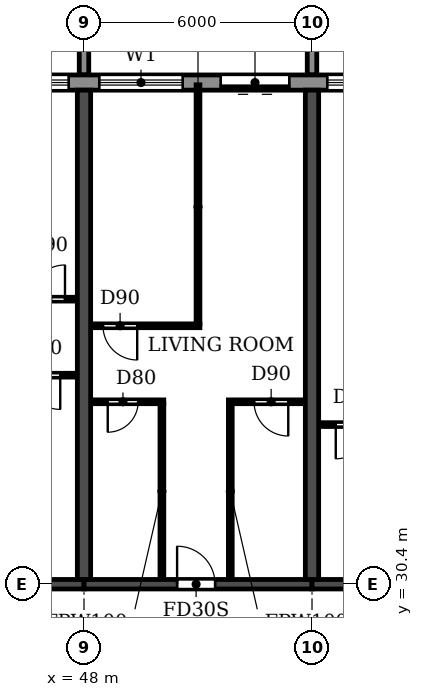
"""IFC4 building model, lengths in metres.
Left out: names, types, materials, properties, quantities, classifications, styles, units other than length and angle.
Written with IfcOpenShell. Run it as: python <this file> out.ifc"""

import sys

from ifc_helpers import new_model, si_unit, direction, frame, frame_2d, origin, place, context, subcontext, project, spatial, polyline, rectangle, outline, extrude, source, transform, mapped, element, fill, save


model = new_model("IFC4")
c1 = context("Model", 3, precision=1e-05, world=origin(), true_north=direction((0.0, 1.0)))
c2 = subcontext(c1, "Body", "Model", "MODEL_VIEW")
j1 = project(units=[si_unit("LENGTHUNIT", "METRE"), si_unit("PLANEANGLEUNIT", "RADIAN")], contexts=[c1])
p1 = place(None, origin())
s1 = spatial("IfcSite", under=j1, at=p1, CompositionType="ELEMENT")
p2 = place(p1, origin())
s2 = spatial("IfcBuilding", under=s1, at=p2, CompositionType="ELEMENT")
p3 = place(p2, frame((0.0, 0.0, 72.9)))
s3 = spatial("IfcBuildingStorey", under=s2, at=p3, CompositionType="ELEMENT", Elevation=72.9)
for number, where, z_axis, x_axis in (
    (1, (48.0, 30.525, 0.0), (0.0, 0.0, 1.0), (0.0, 1.0, 0.0)),
    (2, (54.0, 30.525, 0.0), (0.0, 0.0, 1.0), (0.0, 1.0, 0.0)),
):
    element("IfcWall", number, at=place(p3, frame(where, z_axis=z_axis, x_axis=x_axis)), inside=s3, PredefinedType="SHEAR", context=c2, shape_type="SweptSolid", body=[
        extrude(rectangle(XDim=12.875, YDim=0.35, at=frame_2d((6.438, 0.0))), origin(), (0.0, 0.0, 1.0), 3.06),
    ])
p4 = place(p3, frame((42.0, 30.4, 0.0), z_axis=(0.0, 0.0, 1.0), x_axis=(1.0, 0.0, 0.0)))
e3 = element("IfcWall", 3, at=p4, inside=s3, PredefinedType="SHEAR", context=c2, shape_type="SweptSolid", body=[
    extrude(rectangle(XDim=6.0, YDim=0.25, at=frame_2d((3.0, 0.0))), origin(), (0.0, 0.0, 1.0), 2.46),
])
p5 = place(p4, frame((2.45, 0.0, 0.0)))
e4 = element("IfcOpeningElement", 4, at=p5, cuts=e3, PredefinedType="OPENING", context=c2, shape_type="SweptSolid", body=[
    extrude(rectangle(XDim=1.0, YDim=2.1, at=frame_2d((0.5, 1.05))), frame((0.0, 0.135, 0.0), z_axis=(0.0, -1.0, 0.0), x_axis=(1.0, 0.0, 0.0)), (0.0, 0.0, 1.0), 0.27),
])
p6 = place(p3, frame((48.0, 30.4, 0.0), z_axis=(0.0, 0.0, 1.0), x_axis=(1.0, 0.0, 0.0)))
e5 = element("IfcWall", 5, at=p6, inside=s3, PredefinedType="SHEAR", context=c2, shape_type="SweptSolid", body=[
    extrude(rectangle(XDim=6.0, YDim=0.25, at=frame_2d((3.0, 0.0))), origin(), (0.0, 0.0, 1.0), 2.46),
])
p7 = place(p6, frame((2.45, 0.0, 0.0)))
e6 = element("IfcOpeningElement", 6, at=p7, cuts=e5, PredefinedType="OPENING", context=c2, shape_type="SweptSolid", body=[
    extrude(rectangle(XDim=1.0, YDim=2.1, at=frame_2d((0.5, 1.05))), frame((0.0, 0.135, 0.0), z_axis=(0.0, -1.0, 0.0), x_axis=(1.0, 0.0, 0.0)), (0.0, 0.0, 1.0), 0.27),
])
p8 = place(p3, frame((54.0, 30.4, 0.0), z_axis=(0.0, 0.0, 1.0), x_axis=(1.0, 0.0, 0.0)))
e7 = element("IfcWall", 7, at=p8, inside=s3, PredefinedType="SHEAR", context=c2, shape_type="SweptSolid", body=[
    extrude(rectangle(XDim=6.0, YDim=0.25, at=frame_2d((3.0, 0.0))), origin(), (0.0, 0.0, 1.0), 2.46),
])
p9 = place(p8, frame((2.55, 0.0, 0.0)))
e8 = element("IfcOpeningElement", 8, at=p9, cuts=e7, PredefinedType="OPENING", context=c2, shape_type="SweptSolid", body=[
    extrude(rectangle(XDim=1.0, YDim=2.1, at=frame_2d((0.5, 1.05))), frame((0.0, 0.135, 0.0), z_axis=(0.0, -1.0, 0.0), x_axis=(1.0, 0.0, 0.0)), (0.0, 0.0, 1.0), 0.27),
])
p10 = place(p3, frame((91.317, 43.6, 0.0), z_axis=(0.0, 0.0, 1.0), x_axis=(-1.0, 0.0, 0.0)))
e9 = element("IfcWall", 9, at=p10, inside=s3, PredefinedType="STANDARD", context=c2, shape_type="SweptSolid", body=[
    extrude(rectangle(XDim=80.634, YDim=0.4, at=frame_2d((40.317, 0.0))), origin(), (0.0, 0.0, 1.0), 3.06),
])
p11 = place(p10, frame((76.717, 0.0, 0.9)))
e10 = element("IfcOpeningElement", 10, at=p11, cuts=e9, PredefinedType="OPENING", context=c2, shape_type="SweptSolid", body=[
    extrude(rectangle(XDim=2.2, YDim=1.5, at=frame_2d((1.1, 0.75))), frame((0.0, 0.21, 0.0), z_axis=(0.0, -1.0, 0.0), x_axis=(1.0, 0.0, 0.0)), (0.0, 0.0, 1.0), 0.42),
])
p12 = place(p10, frame((73.917, 0.0, 0.0)))
e11 = element("IfcOpeningElement", 11, at=p12, cuts=e9, PredefinedType="OPENING", context=c2, shape_type="SweptSolid", body=[
    extrude(rectangle(XDim=1.8, YDim=2.4, at=frame_2d((0.9, 1.2))), frame((0.0, 0.21, 0.0), z_axis=(0.0, -1.0, 0.0), x_axis=(1.0, 0.0, 0.0)), (0.0, 0.0, 1.0), 0.42),
])
p13 = place(p10, frame((70.917, 0.0, 0.0)))
e12 = element("IfcOpeningElement", 12, at=p13, cuts=e9, PredefinedType="OPENING", context=c2, shape_type="SweptSolid", body=[
    extrude(rectangle(XDim=1.8, YDim=2.4, at=frame_2d((0.9, 1.2))), frame((0.0, 0.21, 0.0), z_axis=(0.0, -1.0, 0.0), x_axis=(1.0, 0.0, 0.0)), (0.0, 0.0, 1.0), 0.42),
])
p14 = place(p10, frame((67.717, 0.0, 0.9)))
e13 = element("IfcOpeningElement", 13, at=p14, cuts=e9, PredefinedType="OPENING", context=c2, shape_type="SweptSolid", body=[
    extrude(rectangle(XDim=2.2, YDim=1.5, at=frame_2d((1.1, 0.75))), frame((0.0, 0.21, 0.0), z_axis=(0.0, -1.0, 0.0), x_axis=(1.0, 0.0, 0.0)), (0.0, 0.0, 1.0), 0.42),
])
p15 = place(p10, frame((64.717, 0.0, 0.9)))
e14 = element("IfcOpeningElement", 14, at=p15, cuts=e9, PredefinedType="OPENING", context=c2, shape_type="SweptSolid", body=[
    extrude(rectangle(XDim=2.2, YDim=1.5, at=frame_2d((1.1, 0.75))), frame((0.0, 0.21, 0.0), z_axis=(0.0, -1.0, 0.0), x_axis=(1.0, 0.0, 0.0)), (0.0, 0.0, 1.0), 0.42),
])
p16 = place(p10, frame((61.917, 0.0, 0.0)))
e15 = element("IfcOpeningElement", 15, at=p16, cuts=e9, PredefinedType="OPENING", context=c2, shape_type="SweptSolid", body=[
    extrude(rectangle(XDim=1.8, YDim=2.4, at=frame_2d((0.9, 1.2))), frame((0.0, 0.21, 0.0), z_axis=(0.0, -1.0, 0.0), x_axis=(1.0, 0.0, 0.0)), (0.0, 0.0, 1.0), 0.42),
])
p17 = place(p10, frame((58.717, 0.0, 0.9)))
e16 = element("IfcOpeningElement", 16, at=p17, cuts=e9, PredefinedType="OPENING", context=c2, shape_type="SweptSolid", body=[
    extrude(rectangle(XDim=2.2, YDim=1.5, at=frame_2d((1.1, 0.75))), frame((0.0, 0.21, 0.0), z_axis=(0.0, -1.0, 0.0), x_axis=(1.0, 0.0, 0.0)), (0.0, 0.0, 1.0), 0.42),
])
p18 = place(p10, frame((55.917, 0.0, 0.0)))
e17 = element("IfcOpeningElement", 17, at=p18, cuts=e9, PredefinedType="OPENING", context=c2, shape_type="SweptSolid", body=[
    extrude(rectangle(XDim=1.8, YDim=2.4, at=frame_2d((0.9, 1.2))), frame((0.0, 0.21, 0.0), z_axis=(0.0, -1.0, 0.0), x_axis=(1.0, 0.0, 0.0)), (0.0, 0.0, 1.0), 0.42),
])
p19 = place(p10, frame((52.717, 0.0, 0.9)))
e18 = element("IfcOpeningElement", 18, at=p19, cuts=e9, PredefinedType="OPENING", context=c2, shape_type="SweptSolid", body=[
    extrude(rectangle(XDim=2.2, YDim=1.5, at=frame_2d((1.1, 0.75))), frame((0.0, 0.21, 0.0), z_axis=(0.0, -1.0, 0.0), x_axis=(1.0, 0.0, 0.0)), (0.0, 0.0, 1.0), 0.42),
])
p20 = place(p10, frame((49.717, 0.0, 0.9)))
e19 = element("IfcOpeningElement", 19, at=p20, cuts=e9, PredefinedType="OPENING", context=c2, shape_type="SweptSolid", body=[
    extrude(rectangle(XDim=2.2, YDim=1.5, at=frame_2d((1.1, 0.75))), frame((0.0, 0.21, 0.0), z_axis=(0.0, -1.0, 0.0), x_axis=(1.0, 0.0, 0.0)), (0.0, 0.0, 1.0), 0.42),
])
p21 = place(p10, frame((46.917, 0.0, 0.0)))
e20 = element("IfcOpeningElement", 20, at=p21, cuts=e9, PredefinedType="OPENING", context=c2, shape_type="SweptSolid", body=[
    extrude(rectangle(XDim=1.8, YDim=2.4, at=frame_2d((0.9, 1.2))), frame((0.0, 0.21, 0.0), z_axis=(0.0, -1.0, 0.0), x_axis=(1.0, 0.0, 0.0)), (0.0, 0.0, 1.0), 0.42),
])
p22 = place(p10, frame((43.717, 0.0, 0.9)))
e21 = element("IfcOpeningElement", 21, at=p22, cuts=e9, PredefinedType="OPENING", context=c2, shape_type="SweptSolid", body=[
    extrude(rectangle(XDim=2.2, YDim=1.5, at=frame_2d((1.1, 0.75))), frame((0.0, 0.21, 0.0), z_axis=(0.0, -1.0, 0.0), x_axis=(1.0, 0.0, 0.0)), (0.0, 0.0, 1.0), 0.42),
])
p23 = place(p10, frame((40.717, 0.0, 0.9)))
e22 = element("IfcOpeningElement", 22, at=p23, cuts=e9, PredefinedType="OPENING", context=c2, shape_type="SweptSolid", body=[
    extrude(rectangle(XDim=2.2, YDim=1.5, at=frame_2d((1.1, 0.75))), frame((0.0, 0.21, 0.0), z_axis=(0.0, -1.0, 0.0), x_axis=(1.0, 0.0, 0.0)), (0.0, 0.0, 1.0), 0.42),
])
p24 = place(p10, frame((37.917, 0.0, 0.0)))
e23 = element("IfcOpeningElement", 23, at=p24, cuts=e9, PredefinedType="OPENING", context=c2, shape_type="SweptSolid", body=[
    extrude(rectangle(XDim=1.8, YDim=2.4, at=frame_2d((0.9, 1.2))), frame((0.0, 0.21, 0.0), z_axis=(0.0, -1.0, 0.0), x_axis=(1.0, 0.0, 0.0)), (0.0, 0.0, 1.0), 0.42),
])
p25 = place(p10, frame((34.717, 0.0, 0.9)))
e24 = element("IfcOpeningElement", 24, at=p25, cuts=e9, PredefinedType="OPENING", context=c2, shape_type="SweptSolid", body=[
    extrude(rectangle(XDim=2.2, YDim=1.5, at=frame_2d((1.1, 0.75))), frame((0.0, 0.21, 0.0), z_axis=(0.0, -1.0, 0.0), x_axis=(1.0, 0.0, 0.0)), (0.0, 0.0, 1.0), 0.42),
])
p26 = place(p10, frame((31.917, 0.0, 0.0)))
e25 = element("IfcOpeningElement", 25, at=p26, cuts=e9, PredefinedType="OPENING", context=c2, shape_type="SweptSolid", body=[
    extrude(rectangle(XDim=1.8, YDim=2.4, at=frame_2d((0.9, 1.2))), frame((0.0, 0.21, 0.0), z_axis=(0.0, -1.0, 0.0), x_axis=(1.0, 0.0, 0.0)), (0.0, 0.0, 1.0), 0.42),
])
p27 = place(p10, frame((28.717, 0.0, 0.9)))
e26 = element("IfcOpeningElement", 26, at=p27, cuts=e9, PredefinedType="OPENING", context=c2, shape_type="SweptSolid", body=[
    extrude(rectangle(XDim=2.2, YDim=1.5, at=frame_2d((1.1, 0.75))), frame((0.0, 0.21, 0.0), z_axis=(0.0, -1.0, 0.0), x_axis=(1.0, 0.0, 0.0)), (0.0, 0.0, 1.0), 0.42),
])
p28 = place(p10, frame((25.717, 0.0, 0.9)))
e27 = element("IfcOpeningElement", 27, at=p28, cuts=e9, PredefinedType="OPENING", context=c2, shape_type="SweptSolid", body=[
    extrude(rectangle(XDim=2.2, YDim=1.5, at=frame_2d((1.1, 0.75))), frame((0.0, 0.21, 0.0), z_axis=(0.0, -1.0, 0.0), x_axis=(1.0, 0.0, 0.0)), (0.0, 0.0, 1.0), 0.42),
])
p29 = place(p10, frame((22.717, 0.0, 0.9)))
e28 = element("IfcOpeningElement", 28, at=p29, cuts=e9, PredefinedType="OPENING", context=c2, shape_type="SweptSolid", body=[
    extrude(rectangle(XDim=2.2, YDim=1.5, at=frame_2d((1.1, 0.75))), frame((0.0, 0.21, 0.0), z_axis=(0.0, -1.0, 0.0), x_axis=(1.0, 0.0, 0.0)), (0.0, 0.0, 1.0), 0.42),
])
p30 = place(p10, frame((19.917, 0.0, 0.0)))
e29 = element("IfcOpeningElement", 29, at=p30, cuts=e9, PredefinedType="OPENING", context=c2, shape_type="SweptSolid", body=[
    extrude(rectangle(XDim=1.8, YDim=2.4, at=frame_2d((0.9, 1.2))), frame((0.0, 0.21, 0.0), z_axis=(0.0, -1.0, 0.0), x_axis=(1.0, 0.0, 0.0)), (0.0, 0.0, 1.0), 0.42),
])
p31 = place(p10, frame((16.717, 0.0, 0.9)))
e30 = element("IfcOpeningElement", 30, at=p31, cuts=e9, PredefinedType="OPENING", context=c2, shape_type="SweptSolid", body=[
    extrude(rectangle(XDim=2.2, YDim=1.5, at=frame_2d((1.1, 0.75))), frame((0.0, 0.21, 0.0), z_axis=(0.0, -1.0, 0.0), x_axis=(1.0, 0.0, 0.0)), (0.0, 0.0, 1.0), 0.42),
])
p32 = place(p10, frame((13.717, 0.0, 0.9)))
e31 = element("IfcOpeningElement", 31, at=p32, cuts=e9, PredefinedType="OPENING", context=c2, shape_type="SweptSolid", body=[
    extrude(rectangle(XDim=2.2, YDim=1.5, at=frame_2d((1.1, 0.75))), frame((0.0, 0.21, 0.0), z_axis=(0.0, -1.0, 0.0), x_axis=(1.0, 0.0, 0.0)), (0.0, 0.0, 1.0), 0.42),
])
p33 = place(p10, frame((10.717, 0.0, 0.9)))
e32 = element("IfcOpeningElement", 32, at=p33, cuts=e9, PredefinedType="OPENING", context=c2, shape_type="SweptSolid", body=[
    extrude(rectangle(XDim=2.2, YDim=1.5, at=frame_2d((1.1, 0.75))), frame((0.0, 0.21, 0.0), z_axis=(0.0, -1.0, 0.0), x_axis=(1.0, 0.0, 0.0)), (0.0, 0.0, 1.0), 0.42),
])
p34 = place(p10, frame((7.917, 0.0, 0.0)))
e33 = element("IfcOpeningElement", 33, at=p34, cuts=e9, PredefinedType="OPENING", context=c2, shape_type="SweptSolid", body=[
    extrude(rectangle(XDim=1.8, YDim=2.4, at=frame_2d((0.9, 1.2))), frame((0.0, 0.21, 0.0), z_axis=(0.0, -1.0, 0.0), x_axis=(1.0, 0.0, 0.0)), (0.0, 0.0, 1.0), 0.42),
])
p35 = place(p10, frame((4.717, 0.0, 0.9)))
e34 = element("IfcOpeningElement", 34, at=p35, cuts=e9, PredefinedType="OPENING", context=c2, shape_type="SweptSolid", body=[
    extrude(rectangle(XDim=2.2, YDim=1.5, at=frame_2d((1.1, 0.75))), frame((0.0, 0.21, 0.0), z_axis=(0.0, -1.0, 0.0), x_axis=(1.0, 0.0, 0.0)), (0.0, 0.0, 1.0), 0.42),
])
p36 = place(p10, frame((1.917, 0.0, 0.0)))
e35 = element("IfcOpeningElement", 35, at=p36, cuts=e9, PredefinedType="OPENING", context=c2, shape_type="SweptSolid", body=[
    extrude(rectangle(XDim=1.8, YDim=2.4, at=frame_2d((0.9, 1.2))), frame((0.0, 0.21, 0.0), z_axis=(0.0, -1.0, 0.0), x_axis=(1.0, 0.0, 0.0)), (0.0, 0.0, 1.0), 0.42),
])
m1 = source(origin(), c2, "Body", "SweptSolid", [
    extrude(outline(polyline([(0.0, 0.0), (0.25, 0.0), (0.25, 3.1), (0.0, 3.1), (0.0, 0.0)])), origin(), (0.0, 0.0, 1.0), 3.1),
])
for number, where in (
    (36, (47.875, 43.8, 0.0)),
    (37, (53.875, 43.8, 0.0)),
):
    element("IfcWall", number, at=place(p3, frame(where)), inside=s3, PredefinedType="STANDARD", context=c2, shape_type="MappedRepresentation", body=[
        mapped(m1, transform((0.0, 0.0, 0.0))),
    ])
p37 = place(p3, frame((54.185, 34.6, 0.0), z_axis=(0.0, 0.0, 1.0), x_axis=(1.0, 0.0, 0.0)))
e38 = element("IfcWall", 38, at=p37, inside=s3, PredefinedType="PARTITIONING", context=c2, shape_type="SweptSolid", body=[
    extrude(rectangle(XDim=2.015, YDim=0.1, at=frame_2d((1.007, 0.0))), origin(), (0.0, 0.0, 1.0), 3.06),
])
p38 = place(p37, frame((0.44, 0.0, 0.0)))
e39 = element("IfcOpeningElement", 39, at=p38, cuts=e38, PredefinedType="OPENING", context=c2, shape_type="SweptSolid", body=[
    extrude(rectangle(XDim=0.9, YDim=2.1, at=frame_2d((0.45, 1.05))), frame((0.0, 0.06, 0.0), z_axis=(0.0, -1.0, 0.0), x_axis=(1.0, 0.0, 0.0)), (0.0, 0.0, 1.0), 0.12),
])
p39 = place(p3, frame((48.185, 35.2, 0.0), z_axis=(0.0, 0.0, 1.0), x_axis=(1.0, 0.0, 0.0)))
e40 = element("IfcWall", 40, at=p39, inside=s3, PredefinedType="PARTITIONING", context=c2, shape_type="SweptSolid", body=[
    extrude(rectangle(XDim=1.915, YDim=0.1, at=frame_2d((0.958, 0.0))), origin(), (0.0, 0.0, 1.0), 3.06),
])
p40 = place(p39, frame((0.44, 0.0, 0.0)))
e41 = element("IfcOpeningElement", 41, at=p40, cuts=e40, PredefinedType="OPENING", context=c2, shape_type="SweptSolid", body=[
    extrude(rectangle(XDim=0.8, YDim=2.1, at=frame_2d((0.4, 1.05))), frame((0.0, 0.06, 0.0), z_axis=(0.0, -1.0, 0.0), x_axis=(1.0, 0.0, 0.0)), (0.0, 0.0, 1.0), 0.12),
])
p41 = place(p3, frame((51.8, 35.2, 0.0), z_axis=(0.0, 0.0, 1.0), x_axis=(1.0, 0.0, 0.0)))
e42 = element("IfcWall", 42, at=p41, inside=s3, PredefinedType="PARTITIONING", context=c2, shape_type="SweptSolid", body=[
    extrude(rectangle(XDim=2.015, YDim=0.1, at=frame_2d((1.007, 0.0))), origin(), (0.0, 0.0, 1.0), 3.06),
])
p42 = place(p41, frame((0.675, 0.0, 0.0)))
e43 = element("IfcOpeningElement", 43, at=p42, cuts=e42, PredefinedType="OPENING", context=c2, shape_type="SweptSolid", body=[
    extrude(rectangle(XDim=0.9, YDim=2.1, at=frame_2d((0.45, 1.05))), frame((0.0, 0.06, 0.0), z_axis=(0.0, -1.0, 0.0), x_axis=(1.0, 0.0, 0.0)), (0.0, 0.0, 1.0), 0.12),
])
p43 = place(p3, frame((45.8, 35.9, 0.0), z_axis=(0.0, 0.0, 1.0), x_axis=(1.0, 0.0, 0.0)))
e44 = element("IfcWall", 44, at=p43, inside=s3, PredefinedType="PARTITIONING", context=c2, shape_type="SweptSolid", body=[
    extrude(rectangle(XDim=2.015, YDim=0.1, at=frame_2d((1.007, 0.0))), origin(), (0.0, 0.0, 1.0), 3.06),
])
p44 = place(p43, frame((0.675, 0.0, 0.0)))
e45 = element("IfcOpeningElement", 45, at=p44, cuts=e44, PredefinedType="OPENING", context=c2, shape_type="SweptSolid", body=[
    extrude(rectangle(XDim=0.9, YDim=2.1, at=frame_2d((0.45, 1.05))), frame((0.0, 0.06, 0.0), z_axis=(0.0, -1.0, 0.0), x_axis=(1.0, 0.0, 0.0)), (0.0, 0.0, 1.0), 0.12),
])
p45 = place(p3, frame((48.185, 37.2, 0.0), z_axis=(0.0, 0.0, 1.0), x_axis=(1.0, 0.0, 0.0)))
e46 = element("IfcWall", 46, at=p45, inside=s3, PredefinedType="PARTITIONING", context=c2, shape_type="SweptSolid", body=[
    extrude(rectangle(XDim=2.865, YDim=0.1, at=frame_2d((1.433, 0.0))), origin(), (0.0, 0.0, 1.0), 3.06),
])
p46 = place(p45, frame((0.315, 0.0, 0.0)))
e47 = element("IfcOpeningElement", 47, at=p46, cuts=e46, PredefinedType="OPENING", context=c2, shape_type="SweptSolid", body=[
    extrude(rectangle(XDim=0.9, YDim=2.1, at=frame_2d((0.45, 1.05))), frame((0.0, 0.06, 0.0), z_axis=(0.0, -1.0, 0.0), x_axis=(1.0, 0.0, 0.0)), (0.0, 0.0, 1.0), 0.12),
])
p47 = place(p3, frame((44.95, 37.9, 0.0), z_axis=(0.0, 0.0, 1.0), x_axis=(1.0, 0.0, 0.0)))
e48 = element("IfcWall", 48, at=p47, inside=s3, PredefinedType="PARTITIONING", context=c2, shape_type="SweptSolid", body=[
    extrude(rectangle(XDim=2.865, YDim=0.1, at=frame_2d((1.433, 0.0))), origin(), (0.0, 0.0, 1.0), 3.06),
])
p48 = place(p47, frame((1.65, 0.0, 0.0)))
e49 = element("IfcOpeningElement", 49, at=p48, cuts=e48, PredefinedType="OPENING", context=c2, shape_type="SweptSolid", body=[
    extrude(rectangle(XDim=0.9, YDim=2.1, at=frame_2d((0.45, 1.05))), frame((0.0, 0.06, 0.0), z_axis=(0.0, -1.0, 0.0), x_axis=(1.0, 0.0, 0.0)), (0.0, 0.0, 1.0), 0.12),
])
p49 = place(p3, frame((50.05, 30.535, 0.0), z_axis=(0.0, 0.0, 1.0), x_axis=(0.0, 1.0, 0.0)))
e50 = element("IfcWall", 50, at=p49, inside=s3, PredefinedType="PARTITIONING", context=c2, shape_type="SweptSolid", body=[
    extrude(rectangle(XDim=4.615, YDim=0.1, at=frame_2d((2.308, 0.0))), origin(), (0.0, 0.0, 1.0), 3.06),
])
p50 = place(p3, frame((51.0, 37.25, 0.0), z_axis=(0.0, 0.0, 1.0), x_axis=(0.0, 1.0, 0.0)))
e51 = element("IfcWall", 51, at=p50, inside=s3, PredefinedType="PARTITIONING", context=c2, shape_type="SweptSolid", body=[
    extrude(rectangle(XDim=6.29, YDim=0.1, at=frame_2d((3.145, 0.0))), origin(), (0.0, 0.0, 1.0), 3.06),
])
p51 = place(p3, frame((51.85, 30.535, 0.0), z_axis=(0.0, 0.0, 1.0), x_axis=(0.0, 1.0, 0.0)))
e52 = element("IfcWall", 52, at=p51, inside=s3, PredefinedType="PARTITIONING", context=c2, shape_type="SweptSolid", body=[
    extrude(rectangle(XDim=4.615, YDim=0.1, at=frame_2d((2.308, 0.0))), origin(), (0.0, 0.0, 1.0), 3.06),
])
p52 = place(p22, origin())
e53 = element("IfcWindow", 53, at=p52, inside=s3, PartitioningType="DOUBLE_PANEL_HORIZONTAL", PredefinedType="WINDOW", context=c2, shape_type="SweptSolid", body=[
    extrude(rectangle(XDim=2.2, YDim=1.5, at=frame_2d((1.1, 0.75))), frame((0.0, 0.03, 0.0), z_axis=(0.0, -1.0, 0.0), x_axis=(1.0, 0.0, 0.0)), (0.0, 0.0, 1.0), 0.06),
])
fill(e21, e53)
p53 = place(p23, origin())
e54 = element("IfcWindow", 54, at=p53, inside=s3, PartitioningType="DOUBLE_PANEL_HORIZONTAL", PredefinedType="WINDOW", context=c2, shape_type="SweptSolid", body=[
    extrude(rectangle(XDim=2.2, YDim=1.5, at=frame_2d((1.1, 0.75))), frame((0.0, 0.03, 0.0), z_axis=(0.0, -1.0, 0.0), x_axis=(1.0, 0.0, 0.0)), (0.0, 0.0, 1.0), 0.06),
])
fill(e22, e54)
p54 = place(p24, origin())
e55 = element("IfcDoor", 55, at=p54, inside=s3, OperationType="DOUBLE_DOOR_SLIDING", PredefinedType="DOOR", context=c2, shape_type="SweptSolid", body=[
    extrude(rectangle(XDim=1.8, YDim=2.4, at=frame_2d((0.9, 1.2))), frame((0.0, 0.025, 0.0), z_axis=(0.0, -1.0, 0.0), x_axis=(1.0, 0.0, 0.0)), (0.0, 0.0, 1.0), 0.05),
])
fill(e23, e55)
p55 = place(p25, origin())
e56 = element("IfcWindow", 56, at=p55, inside=s3, PartitioningType="DOUBLE_PANEL_HORIZONTAL", PredefinedType="WINDOW", context=c2, shape_type="SweptSolid", body=[
    extrude(rectangle(XDim=2.2, YDim=1.5, at=frame_2d((1.1, 0.75))), frame((0.0, 0.03, 0.0), z_axis=(0.0, -1.0, 0.0), x_axis=(1.0, 0.0, 0.0)), (0.0, 0.0, 1.0), 0.06),
])
fill(e24, e56)
p56 = place(p44, frame((0.9, 0.0, 0.0), z_axis=(0.0, 0.0, 1.0), x_axis=(-1.0, 0.0, 0.0)))
e57 = element("IfcDoor", 57, at=p56, inside=s3, OperationType="SINGLE_SWING_LEFT", PredefinedType="DOOR", context=c2, shape_type="SweptSolid", body=[
    extrude(rectangle(XDim=0.9, YDim=2.1, at=frame_2d((0.45, 1.05))), frame((0.0, 0.025, 0.0), z_axis=(0.0, -1.0, 0.0), x_axis=(1.0, 0.0, 0.0)), (0.0, 0.0, 1.0), 0.05),
])
fill(e45, e57)
p57 = place(p48, origin())
e58 = element("IfcDoor", 58, at=p57, inside=s3, OperationType="SINGLE_SWING_RIGHT", PredefinedType="DOOR", context=c2, shape_type="SweptSolid", body=[
    extrude(rectangle(XDim=0.9, YDim=2.1, at=frame_2d((0.45, 1.05))), frame((0.0, 0.025, 0.0), z_axis=(0.0, -1.0, 0.0), x_axis=(1.0, 0.0, 0.0)), (0.0, 0.0, 1.0), 0.05),
])
fill(e49, e58)
p58 = place(p46, frame((0.9, 0.0, 0.0), z_axis=(0.0, 0.0, 1.0), x_axis=(-1.0, 0.0, 0.0)))
e59 = element("IfcDoor", 59, at=p58, inside=s3, OperationType="SINGLE_SWING_LEFT", PredefinedType="DOOR", context=c2, shape_type="SweptSolid", body=[
    extrude(rectangle(XDim=0.9, YDim=2.1, at=frame_2d((0.45, 1.05))), frame((0.0, 0.025, 0.0), z_axis=(0.0, -1.0, 0.0), x_axis=(1.0, 0.0, 0.0)), (0.0, 0.0, 1.0), 0.05),
])
fill(e47, e59)
p59 = place(p40, frame((0.8, 0.0, 0.0), z_axis=(0.0, 0.0, 1.0), x_axis=(-1.0, 0.0, 0.0)))
e60 = element("IfcDoor", 60, at=p59, inside=s3, OperationType="SINGLE_SWING_RIGHT", PredefinedType="DOOR", context=c2, shape_type="SweptSolid", body=[
    extrude(rectangle(XDim=0.8, YDim=2.1, at=frame_2d((0.4, 1.05))), frame((0.0, 0.025, 0.0), z_axis=(0.0, -1.0, 0.0), x_axis=(1.0, 0.0, 0.0)), (0.0, 0.0, 1.0), 0.05),
])
fill(e41, e60)
p60 = place(p7, origin())
e61 = element("IfcDoor", 61, at=p60, inside=s3, OperationType="SINGLE_SWING_LEFT", PredefinedType="DOOR", context=c2, shape_type="SweptSolid", body=[
    extrude(rectangle(XDim=1.0, YDim=2.1, at=frame_2d((0.5, 1.05))), frame((0.0, 0.025, 0.0), z_axis=(0.0, -1.0, 0.0), x_axis=(1.0, 0.0, 0.0)), (0.0, 0.0, 1.0), 0.05),
])
fill(e6, e61)
p61 = place(p42, frame((0.9, 0.0, 0.0), z_axis=(0.0, 0.0, 1.0), x_axis=(-1.0, 0.0, 0.0)))
e62 = element("IfcDoor", 62, at=p61, inside=s3, OperationType="SINGLE_SWING_LEFT", PredefinedType="DOOR", context=c2, shape_type="SweptSolid", body=[
    extrude(rectangle(XDim=0.9, YDim=2.1, at=frame_2d((0.45, 1.05))), frame((0.0, 0.025, 0.0), z_axis=(0.0, -1.0, 0.0), x_axis=(1.0, 0.0, 0.0)), (0.0, 0.0, 1.0), 0.05),
])
fill(e43, e62)
p62 = place(p38, frame((0.9, 0.0, 0.0), z_axis=(0.0, 0.0, 1.0), x_axis=(-1.0, 0.0, 0.0)))
e63 = element("IfcDoor", 63, at=p62, inside=s3, OperationType="SINGLE_SWING_RIGHT", PredefinedType="DOOR", context=c2, shape_type="SweptSolid", body=[
    extrude(rectangle(XDim=0.9, YDim=2.1, at=frame_2d((0.45, 1.05))), frame((0.0, 0.025, 0.0), z_axis=(0.0, -1.0, 0.0), x_axis=(1.0, 0.0, 0.0)), (0.0, 0.0, 1.0), 0.05),
])
fill(e39, e63)
save(model, sys.argv[1])
